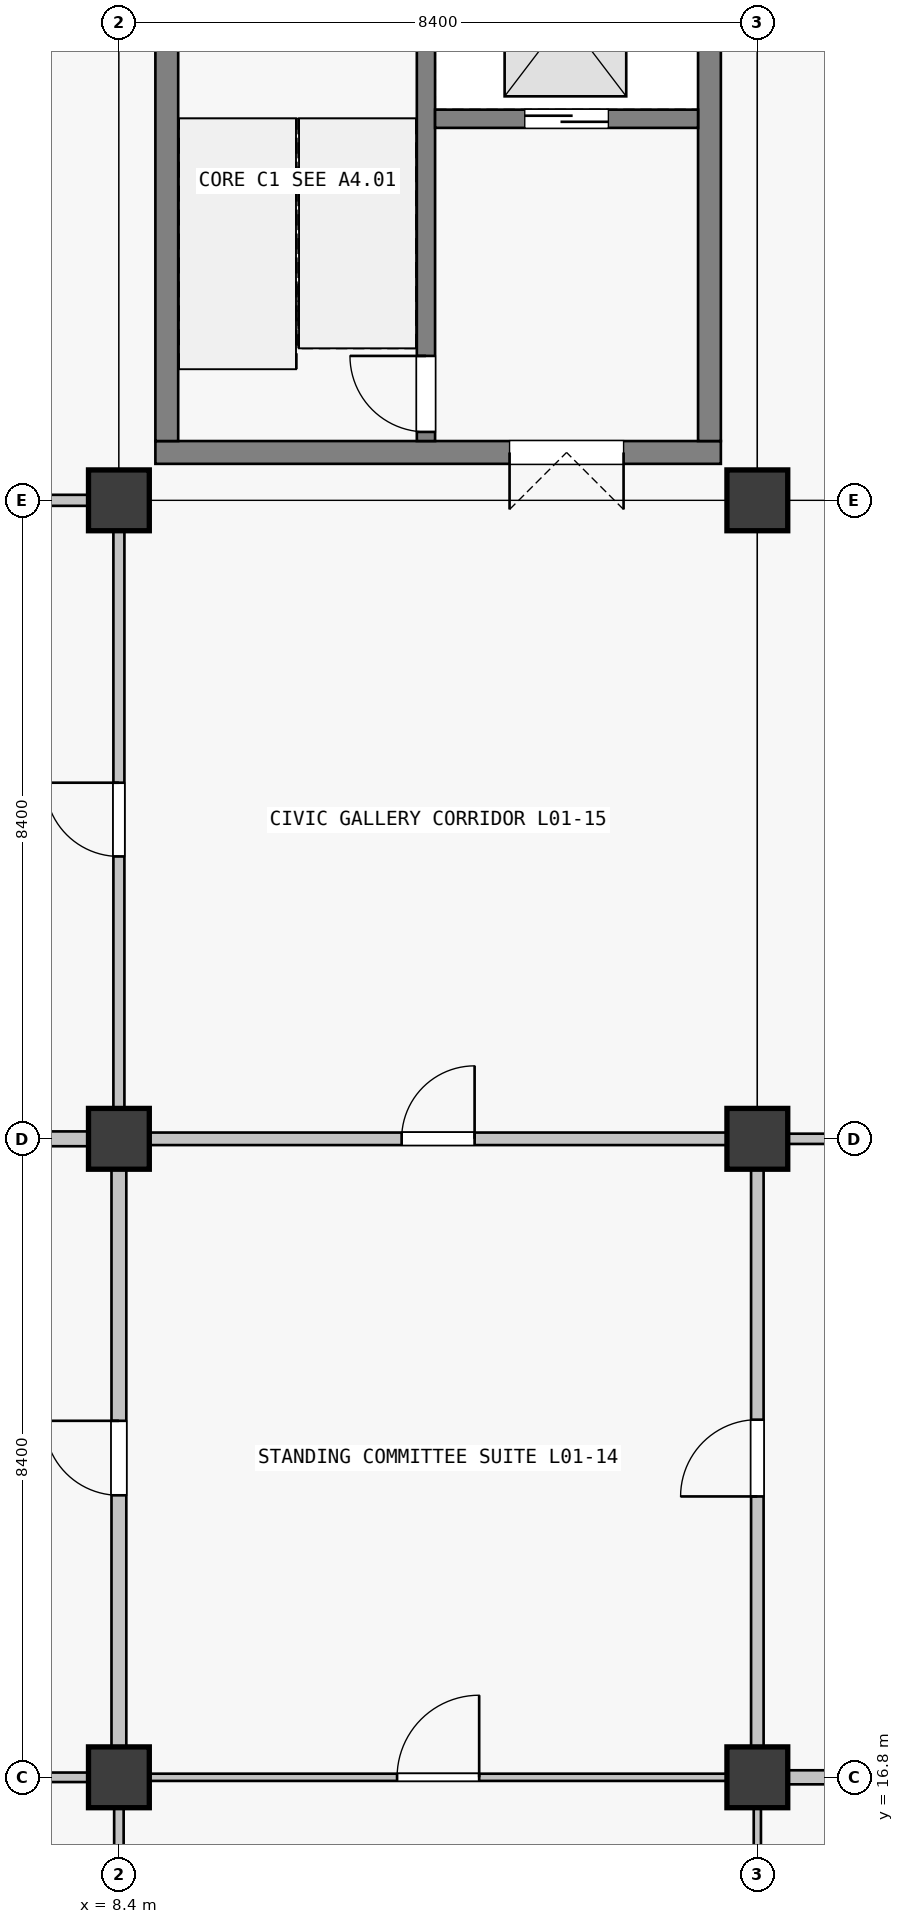
"""IFC4 building model, lengths in metres.
Left out: names, types, materials, properties, quantities, classifications, styles, units other than length and angle.
Written with IfcOpenShell. Run it as: python <this file> out.ifc"""

import sys

from ifc_helpers import new_model, si_unit, direction, frame, frame_2d, origin, origin_2d, place, context, subcontext, project, spatial, rectangle, extrude, element, fill, save


model = new_model("IFC4")
c1 = context("Model", 3, precision=1e-05, world=origin(), true_north=direction((0.0, 1.0)))
c2 = subcontext(c1, "Body", "Model", "MODEL_VIEW")
j1 = project(units=[si_unit("LENGTHUNIT", "METRE"), si_unit("PLANEANGLEUNIT", "RADIAN")], contexts=[c1])
p1 = place(None, origin())
s1 = spatial("IfcSite", under=j1, at=p1, CompositionType="ELEMENT")
p2 = place(p1, origin())
s2 = spatial("IfcBuilding", under=s1, at=p2, CompositionType="ELEMENT")
p3 = place(p2, frame((0.0, 0.0, 5.76)))
s3 = spatial("IfcBuildingStorey", under=s2, at=p3, CompositionType="ELEMENT", Elevation=5.76)
for number, where, z_axis, x_axis in (
    (1, (8.4, 16.8, 0.0), (0.0, 0.0, 1.0), (1.0, 0.0, 0.0)),
    (2, (8.4, 25.2, 0.0), (0.0, 0.0, 1.0), (1.0, 0.0, 0.0)),
    (3, (8.4, 33.6, 0.0), (0.0, 0.0, 1.0), (1.0, 0.0, 0.0)),
    (4, (16.8, 16.8, 0.0), (0.0, 0.0, 1.0), (1.0, 0.0, 0.0)),
    (5, (16.8, 25.2, 0.0), (0.0, 0.0, 1.0), (1.0, 0.0, 0.0)),
    (6, (16.8, 33.6, 0.0), (0.0, 0.0, 1.0), (1.0, 0.0, 0.0)),
):
    element("IfcColumn", number, at=place(p3, frame(where, z_axis=z_axis, x_axis=x_axis)), inside=s3, PredefinedType="COLUMN", context=c2, shape_type="SweptSolid", body=[
        extrude(rectangle(XDim=0.8, YDim=0.8, at=origin_2d()), origin(), (0.0, 0.0, 1.0), 4.5),
    ])
p4 = place(p3, frame((16.32, 34.23, 0.0), z_axis=(0.0, 0.0, 1.0), x_axis=(-1.0, 0.0, 0.0)))
e7 = element("IfcWall", 7, at=p4, inside=s3, PredefinedType="SHEAR", context=c2, shape_type="SweptSolid", body=[
    extrude(rectangle(XDim=7.44, YDim=0.3, at=frame_2d((3.72, 0.0))), origin(), (0.0, 0.0, 1.0), 4.5),
])
p5 = place(p4, frame((1.28, 0.0, 0.0)))
e8 = element("IfcOpeningElement", 8, at=p5, cuts=e7, PredefinedType="OPENING", context=c2, shape_type="SweptSolid", body=[
    extrude(rectangle(XDim=1.5, YDim=2.15, at=frame_2d((0.75, 1.075))), frame((0.0, 0.15, 0.0), z_axis=(0.0, -1.0, 0.0), x_axis=(1.0, 0.0, 0.0)), (0.0, 0.0, 1.0), 0.3),
])
for number, where, z_axis, x_axis in (
    (9, (9.03, 34.38, 0.0), (0.0, 0.0, 1.0), (0.0, 1.0, 0.0)),
    (10, (16.17, 41.22, 0.0), (0.0, 0.0, 1.0), (0.0, -1.0, 0.0)),
):
    element("IfcWall", number, at=place(p3, frame(where, z_axis=z_axis, x_axis=x_axis)), inside=s3, PredefinedType="SHEAR", context=c2, shape_type="SweptSolid", body=[
        extrude(rectangle(XDim=6.84, YDim=0.3, at=frame_2d((3.42, 0.0))), origin(), (0.0, 0.0, 1.0), 4.5),
    ])
p6 = place(p3, frame((12.44, 34.38, 0.0), z_axis=(0.0, 0.0, 1.0), x_axis=(0.0, 1.0, 0.0)))
e11 = element("IfcWall", 11, at=p6, inside=s3, PredefinedType="SHEAR", context=c2, shape_type="SweptSolid", body=[
    extrude(rectangle(XDim=6.84, YDim=0.24, at=frame_2d((3.42, 0.0))), origin(), (0.0, 0.0, 1.0), 4.5),
])
p7 = place(p6, frame((0.12, 0.0, 0.0)))
e12 = element("IfcOpeningElement", 12, at=p7, cuts=e11, PredefinedType="OPENING", context=c2, shape_type="SweptSolid", body=[
    extrude(rectangle(XDim=1.0, YDim=2.15, at=frame_2d((0.5, 1.075))), frame((0.0, 0.12, 0.0), z_axis=(0.0, -1.0, 0.0), x_axis=(1.0, 0.0, 0.0)), (0.0, 0.0, 1.0), 0.24),
])
p8 = place(p3, frame((12.56, 38.62, 0.0), z_axis=(0.0, 0.0, 1.0), x_axis=(1.0, 0.0, 0.0)))
e13 = element("IfcWall", 13, at=p8, inside=s3, PredefinedType="SHEAR", context=c2, shape_type="SweptSolid", body=[
    extrude(rectangle(XDim=3.46, YDim=0.24, at=frame_2d((1.73, 0.0))), origin(), (0.0, 0.0, 1.0), 4.5),
])
p9 = place(p8, frame((1.18, 0.0, 0.0)))
e14 = element("IfcOpeningElement", 14, at=p9, cuts=e13, PredefinedType="OPENING", context=c2, shape_type="SweptSolid", body=[
    extrude(rectangle(XDim=1.1, YDim=2.15, at=frame_2d((0.55, 1.075))), frame((0.0, 0.12, 0.0), z_axis=(0.0, -1.0, 0.0), x_axis=(1.0, 0.0, 0.0)), (0.0, 0.0, 1.0), 0.24),
])
p10 = place(p3, frame((0.277, 16.8, 0.0), z_axis=(0.0, 0.0, 1.0), x_axis=(1.0, 0.0, 0.0)))
e15 = element("IfcWall", 15, at=p10, inside=s3, PredefinedType="PARTITIONING", context=c2, shape_type="SweptSolid", body=[
    extrude(rectangle(XDim=7.721, YDim=0.125, at=frame_2d((3.86, 0.0))), origin(), (0.0, 0.0, 1.0), 2.4),
])
p11 = place(p10, frame((3.33, 0.0, 0.0)))
e16 = element("IfcOpeningElement", 16, at=p11, cuts=e15, PredefinedType="OPENING", context=c2, shape_type="SweptSolid", body=[
    extrude(rectangle(XDim=1.06, YDim=2.22, at=frame_2d((0.53, 1.11))), frame((0.0, 0.062, 0.0), z_axis=(0.0, -1.0, 0.0), x_axis=(1.0, 0.0, 0.0)), (0.0, 0.0, 1.0), 0.125),
])
p12 = place(p3, frame((0.277, 25.2, 0.0), z_axis=(0.0, 0.0, 1.0), x_axis=(1.0, 0.0, 0.0)))
e17 = element("IfcWall", 17, at=p12, inside=s3, PredefinedType="PARTITIONING", context=c2, shape_type="SweptSolid", body=[
    extrude(rectangle(XDim=7.721, YDim=0.195, at=frame_2d((3.86, 0.0))), origin(), (0.0, 0.0, 1.0), 2.4),
])
p13 = place(p12, frame((3.396, 0.0, 0.0)))
e18 = element("IfcOpeningElement", 18, at=p13, cuts=e17, PredefinedType="OPENING", context=c2, shape_type="SweptSolid", body=[
    extrude(rectangle(XDim=0.93, YDim=2.12, at=frame_2d((0.465, 1.06))), frame((0.0, 0.098, 0.0), z_axis=(0.0, -1.0, 0.0), x_axis=(1.0, 0.0, 0.0)), (0.0, 0.0, 1.0), 0.195),
])
p14 = place(p3, frame((0.277, 33.6, 0.0), z_axis=(0.0, 0.0, 1.0), x_axis=(1.0, 0.0, 0.0)))
e19 = element("IfcWall", 19, at=p14, inside=s3, PredefinedType="PARTITIONING", context=c2, shape_type="SweptSolid", body=[
    extrude(rectangle(XDim=7.721, YDim=0.145, at=frame_2d((3.86, 0.0))), origin(), (0.0, 0.0, 1.0), 2.4),
])
p15 = place(p14, frame((3.341, 0.0, 0.0)))
e20 = element("IfcOpeningElement", 20, at=p15, cuts=e19, PredefinedType="OPENING", context=c2, shape_type="SweptSolid", body=[
    extrude(rectangle(XDim=1.04, YDim=2.2, at=frame_2d((0.52, 1.1))), frame((0.0, 0.073, 0.0), z_axis=(0.0, -1.0, 0.0), x_axis=(1.0, 0.0, 0.0)), (0.0, 0.0, 1.0), 0.145),
])
p16 = place(p3, frame((8.802, 16.8, 0.0), z_axis=(0.0, 0.0, 1.0), x_axis=(1.0, 0.0, 0.0)))
e21 = element("IfcWall", 21, at=p16, inside=s3, PredefinedType="PARTITIONING", context=c2, shape_type="SweptSolid", body=[
    extrude(rectangle(XDim=7.596, YDim=0.095, at=frame_2d((3.798, 0.0))), origin(), (0.0, 0.0, 1.0), 2.4),
])
p17 = place(p16, frame((3.258, 0.0, 0.0)))
e22 = element("IfcOpeningElement", 22, at=p17, cuts=e21, PredefinedType="OPENING", context=c2, shape_type="SweptSolid", body=[
    extrude(rectangle(XDim=1.08, YDim=2.22, at=frame_2d((0.54, 1.11))), frame((0.0, 0.047, 0.0), z_axis=(0.0, -1.0, 0.0), x_axis=(1.0, 0.0, 0.0)), (0.0, 0.0, 1.0), 0.095),
])
p18 = place(p3, frame((8.802, 25.2, 0.0), z_axis=(0.0, 0.0, 1.0), x_axis=(1.0, 0.0, 0.0)))
e23 = element("IfcWall", 23, at=p18, inside=s3, PredefinedType="PARTITIONING", context=c2, shape_type="SweptSolid", body=[
    extrude(rectangle(XDim=7.596, YDim=0.165, at=frame_2d((3.798, 0.0))), origin(), (0.0, 0.0, 1.0), 2.4),
])
p19 = place(p18, frame((3.318, 0.0, 0.0)))
e24 = element("IfcOpeningElement", 24, at=p19, cuts=e23, PredefinedType="OPENING", context=c2, shape_type="SweptSolid", body=[
    extrude(rectangle(XDim=0.96, YDim=2.18, at=frame_2d((0.48, 1.09))), frame((0.0, 0.083, 0.0), z_axis=(0.0, -1.0, 0.0), x_axis=(1.0, 0.0, 0.0)), (0.0, 0.0, 1.0), 0.165),
])
p20 = place(p3, frame((17.202, 16.8, 0.0), z_axis=(0.0, 0.0, 1.0), x_axis=(1.0, 0.0, 0.0)))
e25 = element("IfcWall", 25, at=p20, inside=s3, PredefinedType="PARTITIONING", context=c2, shape_type="SweptSolid", body=[
    extrude(rectangle(XDim=7.596, YDim=0.185, at=frame_2d((3.798, 0.0))), origin(), (0.0, 0.0, 1.0), 2.4),
])
p21 = place(p20, frame((3.268, 0.0, 0.0)))
e26 = element("IfcOpeningElement", 26, at=p21, cuts=e25, PredefinedType="OPENING", context=c2, shape_type="SweptSolid", body=[
    extrude(rectangle(XDim=1.06, YDim=2.22, at=frame_2d((0.53, 1.11))), frame((0.0, 0.093, 0.0), z_axis=(0.0, -1.0, 0.0), x_axis=(1.0, 0.0, 0.0)), (0.0, 0.0, 1.0), 0.185),
])
p22 = place(p3, frame((17.202, 25.2, 0.0), z_axis=(0.0, 0.0, 1.0), x_axis=(1.0, 0.0, 0.0)))
e27 = element("IfcWall", 27, at=p22, inside=s3, PredefinedType="PARTITIONING", context=c2, shape_type="SweptSolid", body=[
    extrude(rectangle(XDim=7.596, YDim=0.135, at=frame_2d((3.798, 0.0))), origin(), (0.0, 0.0, 1.0), 2.4),
])
p23 = place(p22, frame((3.338, 0.0, 0.0)))
e28 = element("IfcOpeningElement", 28, at=p23, cuts=e27, PredefinedType="OPENING", context=c2, shape_type="SweptSolid", body=[
    extrude(rectangle(XDim=0.92, YDim=2.15, at=frame_2d((0.46, 1.075))), frame((0.0, 0.067, 0.0), z_axis=(0.0, -1.0, 0.0), x_axis=(1.0, 0.0, 0.0)), (0.0, 0.0, 1.0), 0.135),
])
p24 = place(p3, frame((8.4, 8.727, 0.0), z_axis=(0.0, 0.0, 1.0), x_axis=(0.0, 1.0, 0.0)))
e29 = element("IfcWall", 29, at=p24, inside=s3, PredefinedType="PARTITIONING", context=c2, shape_type="SweptSolid", body=[
    extrude(rectangle(XDim=7.671, YDim=0.125, at=frame_2d((3.835, 0.0))), origin(), (0.0, 0.0, 1.0), 2.4),
])
p25 = place(p24, frame((3.336, 0.0, 0.0)))
e30 = element("IfcOpeningElement", 30, at=p25, cuts=e29, PredefinedType="OPENING", context=c2, shape_type="SweptSolid", body=[
    extrude(rectangle(XDim=1.0, YDim=2.2, at=frame_2d((0.5, 1.1))), frame((0.0, 0.062, 0.0), z_axis=(0.0, -1.0, 0.0), x_axis=(1.0, 0.0, 0.0)), (0.0, 0.0, 1.0), 0.125),
])
p26 = place(p3, frame((8.4, 17.202, 0.0), z_axis=(0.0, 0.0, 1.0), x_axis=(0.0, 1.0, 0.0)))
e31 = element("IfcWall", 31, at=p26, inside=s3, PredefinedType="PARTITIONING", context=c2, shape_type="SweptSolid", body=[
    extrude(rectangle(XDim=7.596, YDim=0.195, at=frame_2d((3.798, 0.0))), origin(), (0.0, 0.0, 1.0), 2.4),
])
p27 = place(p26, frame((3.308, 0.0, 0.0)))
e32 = element("IfcOpeningElement", 32, at=p27, cuts=e31, PredefinedType="OPENING", context=c2, shape_type="SweptSolid", body=[
    extrude(rectangle(XDim=0.98, YDim=2.18, at=frame_2d((0.49, 1.09))), frame((0.0, 0.098, 0.0), z_axis=(0.0, -1.0, 0.0), x_axis=(1.0, 0.0, 0.0)), (0.0, 0.0, 1.0), 0.195),
])
p28 = place(p3, frame((8.4, 25.602, 0.0), z_axis=(0.0, 0.0, 1.0), x_axis=(0.0, 1.0, 0.0)))
e33 = element("IfcWall", 33, at=p28, inside=s3, PredefinedType="PARTITIONING", context=c2, shape_type="SweptSolid", body=[
    extrude(rectangle(XDim=7.596, YDim=0.145, at=frame_2d((3.798, 0.0))), origin(), (0.0, 0.0, 1.0), 2.4),
])
p29 = place(p28, frame((3.313, 0.0, 0.0)))
e34 = element("IfcOpeningElement", 34, at=p29, cuts=e33, PredefinedType="OPENING", context=c2, shape_type="SweptSolid", body=[
    extrude(rectangle(XDim=0.97, YDim=2.12, at=frame_2d((0.485, 1.06))), frame((0.0, 0.073, 0.0), z_axis=(0.0, -1.0, 0.0), x_axis=(1.0, 0.0, 0.0)), (0.0, 0.0, 1.0), 0.145),
])
p30 = place(p3, frame((16.8, 8.702, 0.0), z_axis=(0.0, 0.0, 1.0), x_axis=(0.0, 1.0, 0.0)))
e35 = element("IfcWall", 35, at=p30, inside=s3, PredefinedType="PARTITIONING", context=c2, shape_type="SweptSolid", body=[
    extrude(rectangle(XDim=7.696, YDim=0.095, at=frame_2d((3.848, 0.0))), origin(), (0.0, 0.0, 1.0), 2.4),
])
p31 = place(p30, frame((3.323, 0.0, 0.0)))
e36 = element("IfcOpeningElement", 36, at=p31, cuts=e35, PredefinedType="OPENING", context=c2, shape_type="SweptSolid", body=[
    extrude(rectangle(XDim=1.05, YDim=2.12, at=frame_2d((0.525, 1.06))), frame((0.0, 0.047, 0.0), z_axis=(0.0, -1.0, 0.0), x_axis=(1.0, 0.0, 0.0)), (0.0, 0.0, 1.0), 0.095),
])
p32 = place(p3, frame((16.8, 17.202, 0.0), z_axis=(0.0, 0.0, 1.0), x_axis=(0.0, 1.0, 0.0)))
e37 = element("IfcWall", 37, at=p32, inside=s3, PredefinedType="PARTITIONING", context=c2, shape_type="SweptSolid", body=[
    extrude(rectangle(XDim=7.596, YDim=0.165, at=frame_2d((3.798, 0.0))), origin(), (0.0, 0.0, 1.0), 2.4),
])
p33 = place(p32, frame((3.293, 0.0, 0.0)))
e38 = element("IfcOpeningElement", 38, at=p33, cuts=e37, PredefinedType="OPENING", context=c2, shape_type="SweptSolid", body=[
    extrude(rectangle(XDim=1.01, YDim=2.12, at=frame_2d((0.505, 1.06))), frame((0.0, 0.083, 0.0), z_axis=(0.0, -1.0, 0.0), x_axis=(1.0, 0.0, 0.0)), (0.0, 0.0, 1.0), 0.165),
])
p34 = place(p7, origin())
e39 = element("IfcDoor", 39, at=p34, inside=s3, OperationType="SINGLE_SWING_RIGHT", PredefinedType="DOOR", context=c2, shape_type="SweptSolid", body=[
    extrude(rectangle(XDim=1.0, YDim=2.15, at=frame_2d((0.5, 1.075))), frame((0.0, 0.025, 0.0), z_axis=(0.0, -1.0, 0.0), x_axis=(1.0, 0.0, 0.0)), (0.0, 0.0, 1.0), 0.05),
])
fill(e12, e39)
p35 = place(p5, origin())
e40 = element("IfcDoor", 40, at=p35, inside=s3, OperationType="DOUBLE_DOOR_SINGLE_SWING", PredefinedType="DOOR", context=c2, shape_type="SweptSolid", body=[
    extrude(rectangle(XDim=1.5, YDim=2.15, at=frame_2d((0.75, 1.075))), frame((0.0, 0.025, 0.0), z_axis=(0.0, -1.0, 0.0), x_axis=(1.0, 0.0, 0.0)), (0.0, 0.0, 1.0), 0.05),
])
fill(e8, e40)
p36 = place(p9, origin())
e41 = element("IfcDoor", 41, at=p36, inside=s3, OperationType="DOUBLE_DOOR_SLIDING", PredefinedType="DOOR", context=c2, shape_type="SweptSolid", body=[
    extrude(rectangle(XDim=1.1, YDim=2.15, at=frame_2d((0.55, 1.075))), frame((0.0, 0.025, 0.0), z_axis=(0.0, -1.0, 0.0), x_axis=(1.0, 0.0, 0.0)), (0.0, 0.0, 1.0), 0.05),
])
fill(e14, e41)
p37 = place(p19, origin())
e42 = element("IfcDoor", 42, at=p37, inside=s3, OperationType="SINGLE_SWING_RIGHT", PredefinedType="DOOR", context=c2, shape_type="SweptSolid", body=[
    extrude(rectangle(XDim=0.96, YDim=2.18, at=frame_2d((0.48, 1.09))), frame((0.0, 0.025, 0.0), z_axis=(0.0, -1.0, 0.0), x_axis=(1.0, 0.0, 0.0)), (0.0, 0.0, 1.0), 0.05),
])
fill(e24, e42)
p38 = place(p29, origin())
e43 = element("IfcDoor", 43, at=p38, inside=s3, OperationType="SINGLE_SWING_RIGHT", PredefinedType="DOOR", context=c2, shape_type="SweptSolid", body=[
    extrude(rectangle(XDim=0.97, YDim=2.12, at=frame_2d((0.485, 1.06))), frame((0.0, 0.025, 0.0), z_axis=(0.0, -1.0, 0.0), x_axis=(1.0, 0.0, 0.0)), (0.0, 0.0, 1.0), 0.05),
])
fill(e34, e43)
p39 = place(p17, origin())
e44 = element("IfcDoor", 44, at=p39, inside=s3, OperationType="SINGLE_SWING_RIGHT", PredefinedType="DOOR", context=c2, shape_type="SweptSolid", body=[
    extrude(rectangle(XDim=1.08, YDim=2.22, at=frame_2d((0.54, 1.11))), frame((0.0, 0.025, 0.0), z_axis=(0.0, -1.0, 0.0), x_axis=(1.0, 0.0, 0.0)), (0.0, 0.0, 1.0), 0.05),
])
fill(e22, e44)
p40 = place(p27, origin())
e45 = element("IfcDoor", 45, at=p40, inside=s3, OperationType="SINGLE_SWING_RIGHT", PredefinedType="DOOR", context=c2, shape_type="SweptSolid", body=[
    extrude(rectangle(XDim=0.98, YDim=2.18, at=frame_2d((0.49, 1.09))), frame((0.0, 0.025, 0.0), z_axis=(0.0, -1.0, 0.0), x_axis=(1.0, 0.0, 0.0)), (0.0, 0.0, 1.0), 0.05),
])
fill(e32, e45)
p41 = place(p33, origin())
e46 = element("IfcDoor", 46, at=p41, inside=s3, OperationType="SINGLE_SWING_LEFT", PredefinedType="DOOR", context=c2, shape_type="SweptSolid", body=[
    extrude(rectangle(XDim=1.01, YDim=2.12, at=frame_2d((0.505, 1.06))), frame((0.0, 0.025, 0.0), z_axis=(0.0, -1.0, 0.0), x_axis=(1.0, 0.0, 0.0)), (0.0, 0.0, 1.0), 0.05),
])
fill(e38, e46)
save(model, sys.argv[1])
